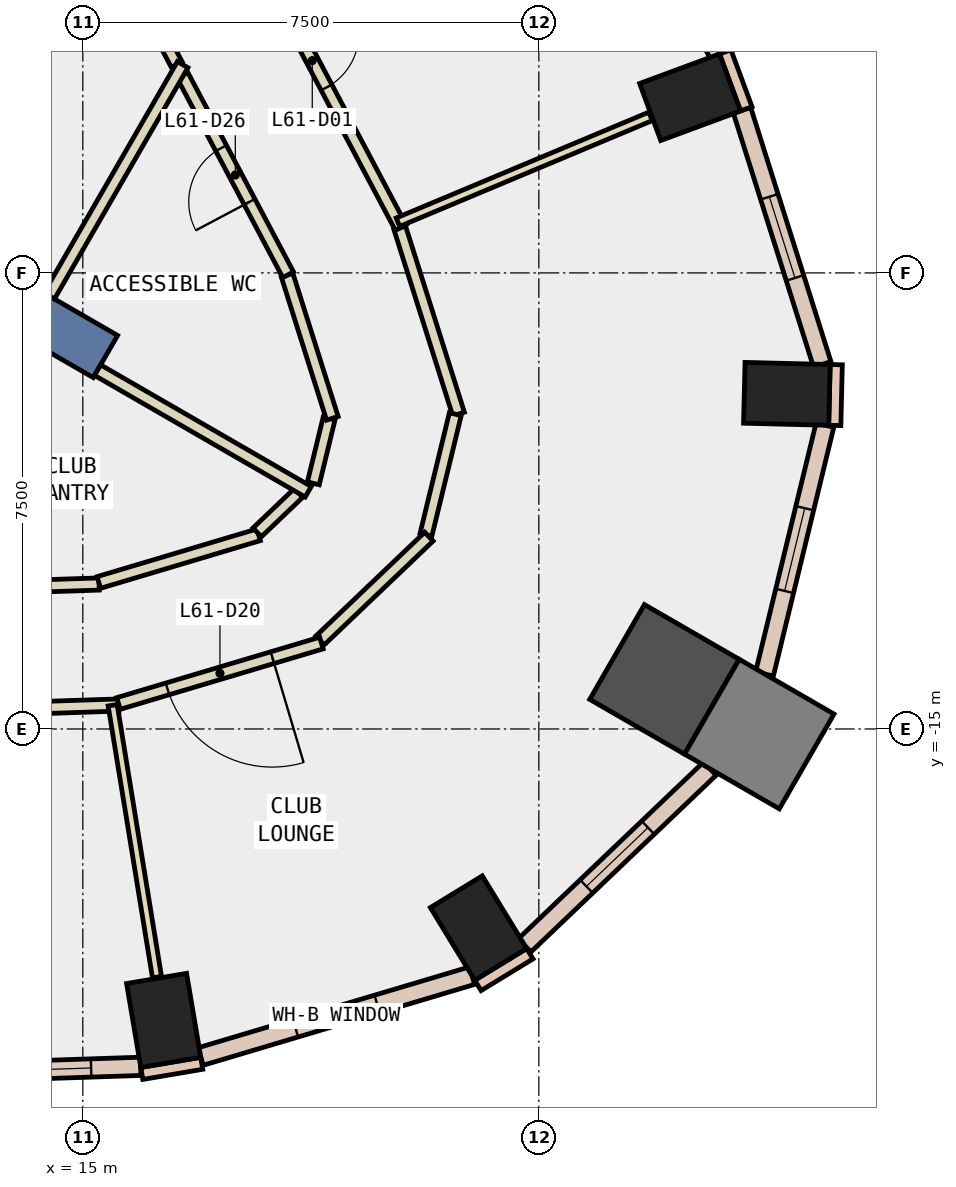
"""IFC4 building model, lengths in metres.
Left out: names, types, materials, properties, quantities, classifications, styles, units other than length and angle.
Written with IfcOpenShell. Run it as: python <this file> out.ifc"""

import sys

from ifc_helpers import new_model, si_unit, direction, frame, frame_2d, origin, origin_2d, place, context, subcontext, project, spatial, rectangle, extrude, element, fill, save


model = new_model("IFC4")
c1 = context("Model", 3, precision=1e-05, world=origin(), true_north=direction((0.0, 1.0)))
c2 = subcontext(c1, "Body", "Model", "MODEL_VIEW")
j1 = project(units=[si_unit("LENGTHUNIT", "METRE"), si_unit("PLANEANGLEUNIT", "RADIAN")], contexts=[c1])
p1 = place(None, origin())
s1 = spatial("IfcSite", under=j1, at=p1, CompositionType="ELEMENT")
p2 = place(p1, origin())
s2 = spatial("IfcBuilding", under=s1, at=p2, CompositionType="ELEMENT")
p3 = place(p2, frame((0.0, 0.0, 266.6)))
s3 = spatial("IfcBuildingStorey", under=s2, at=p3, CompositionType="ELEMENT", Elevation=266.6)
for number, where, z_axis, x_axis in (
    (1, (16.33, -19.793, -0.34), (0.0, 0.0, 1.0), (0.986, 0.167, 0.0)),
    (2, (21.508, -18.274, -0.34), (0.0, 0.0, 1.0), (0.853, 0.521, 0.0)),
):
    element("IfcColumn", number, at=place(p3, frame(where, z_axis=z_axis, x_axis=x_axis)), inside=s3, PredefinedType="COLUMN", context=c2, shape_type="SweptSolid", body=[
        extrude(rectangle(XDim=1.0, YDim=1.4, at=origin_2d()), origin(), (0.0, 0.0, 1.0), 3.6),
    ])
p4 = place(p3, frame((24.566, -14.184, -0.34), z_axis=(0.0, 0.0, 1.0), x_axis=(-0.866025403784, 0.5, 0.0)))
e3 = element("IfcColumn", 3, at=p4, inside=s3, PredefinedType="COLUMN", context=c2, shape_type="SweptSolid", body=[
    extrude(rectangle(XDim=1.8, YDim=1.8, at=origin_2d()), origin(), (0.0, 0.0, 1.0), 3.6),
])
for number, where, z_axis, x_axis in (
    (4, (26.579, -9.489, -0.34), (0.0, 0.0, 1.0), (0.025, 1.0, 0.0)),
    (5, (24.988, -4.611, -0.34), (0.0, 0.0, 1.0), (-0.347, 0.938, 0.0)),
):
    element("IfcColumn", number, at=place(p3, frame(where, z_axis=z_axis, x_axis=x_axis)), inside=s3, PredefinedType="COLUMN", context=c2, shape_type="SweptSolid", body=[
        extrude(rectangle(XDim=1.0, YDim=1.4, at=origin_2d()), origin(), (0.0, 0.0, 1.0), 3.6),
    ])
p5 = place(p3, frame((26.125, -15.084, -0.34), z_axis=(0.0, 0.0, 1.0), x_axis=(-0.866025403784, 0.5, 0.0)))
e6 = element("IfcColumn", 6, at=p5, inside=s3, PredefinedType="COLUMN", context=c2, shape_type="SweptSolid", body=[
    extrude(rectangle(XDim=1.8, YDim=1.8, at=origin_2d()), origin(), (0.0, 0.0, 1.0), 3.6),
])
p6 = place(p3, frame((7.578, -4.375, -0.34), z_axis=(0.0, 0.0, 1.0), x_axis=(0.866024315419, -0.5000018851, 0.0)))
e7 = element("IfcWall", 7, at=p6, inside=s3, PredefinedType="SHEAR", context=c2, shape_type="SweptSolid", body=[
    extrude(rectangle(XDim=9.0, YDim=0.8, at=frame_2d((4.5, 0.0))), origin(), (0.0, 0.0, 1.0), 3.6),
])
for number, where, z_axis, x_axis in (
    (8, (25.912, -4.803, 0.0), (0.0, 0.0, 1.0), (-0.347, 0.938, 0.0)),
    (9, (15.97, -20.665, 0.0), (0.0, 0.0, 1.0), (0.986, 0.167, 0.0)),
):
    element("IfcWall", number, at=place(p3, frame(where, z_axis=z_axis, x_axis=x_axis)), inside=s3, PredefinedType="STANDARD", context=c2, shape_type="SweptSolid", body=[
        extrude(rectangle(XDim=1.0, YDim=0.2, at=frame_2d((0.5, 0.0))), origin(), (0.0, 0.0, 1.0), 3.26),
    ])
p7 = place(p3, frame((21.498, -19.217, 0.0), z_axis=(0.0, 0.0, 1.0), x_axis=(0.853679739553, 0.520798331677, 0.0)))
e10 = element("IfcWall", 10, at=p7, inside=s3, PredefinedType="STANDARD", context=c2, shape_type="SweptSolid", body=[
    extrude(rectangle(XDim=1.0, YDim=0.2, at=frame_2d((0.5, 0.0))), origin(), (0.0, 0.0, 1.0), 3.26),
])
p8 = place(p3, frame((27.367, -10.008, 0.0), z_axis=(0.0, 0.0, 1.0), x_axis=(0.024186470916, 0.999707464524, 0.0)))
e11 = element("IfcWall", 11, at=p8, inside=s3, PredefinedType="STANDARD", context=c2, shape_type="SweptSolid", body=[
    extrude(rectangle(XDim=0.999, YDim=0.2, at=frame_2d((0.5, 0.0))), origin(), (0.0, 0.0, 1.0), 3.26),
])
p9 = place(p3, frame((8.296, -20.802, 0.0), z_axis=(0.0, 0.0, 1.0), x_axis=(0.999450376985, 0.033150323459, 0.0)))
e12 = element("IfcWall", 12, at=p9, inside=s3, PredefinedType="STANDARD", context=c2, shape_type="SweptSolid", body=[
    extrude(rectangle(XDim=7.659, YDim=0.3, at=frame_2d((3.83, 0.0))), origin(), (0.0, 0.0, 1.0), 3.26),
])
p10 = place(p9, frame((0.815, 0.0, 0.9)))
e13 = element("IfcOpeningElement", 13, at=p10, cuts=e12, PredefinedType="OPENING", context=c2, shape_type="SweptSolid", body=[
    extrude(rectangle(XDim=2.2, YDim=2.0, at=frame_2d((1.1, 1.0))), frame((0.0, 0.16, 0.0), z_axis=(0.0, -1.0, 0.0), x_axis=(1.0, 0.0, 0.0)), (0.0, 0.0, 1.0), 0.32),
])
p11 = place(p9, frame((4.644, 0.0, 0.9)))
e14 = element("IfcOpeningElement", 14, at=p11, cuts=e12, PredefinedType="OPENING", context=c2, shape_type="SweptSolid", body=[
    extrude(rectangle(XDim=2.2, YDim=2.0, at=frame_2d((1.1, 1.0))), frame((0.0, 0.16, 0.0), z_axis=(0.0, -1.0, 0.0), x_axis=(1.0, 0.0, 0.0)), (0.0, 0.0, 1.0), 0.32),
])
p12 = place(p3, frame((16.937, -20.387, 0.0), z_axis=(0.0, 0.0, 1.0), x_axis=(0.958361270465, 0.285558532131, 0.0)))
e15 = element("IfcWall", 15, at=p12, inside=s3, PredefinedType="STANDARD", context=c2, shape_type="SweptSolid", body=[
    extrude(rectangle(XDim=4.658, YDim=0.3, at=frame_2d((2.329, 0.0))), origin(), (0.0, 0.0, 1.0), 3.26),
])
p13 = place(p12, frame((1.629, 0.0, 0.9)))
e16 = element("IfcOpeningElement", 16, at=p13, cuts=e15, PredefinedType="OPENING", context=c2, shape_type="SweptSolid", body=[
    extrude(rectangle(XDim=1.4, YDim=2.0, at=frame_2d((0.7, 1.0))), frame((0.0, 0.16, 0.0), z_axis=(0.0, -1.0, 0.0), x_axis=(1.0, 0.0, 0.0)), (0.0, 0.0, 1.0), 0.32),
])
p14 = place(p3, frame((22.266, -18.559, 0.0), z_axis=(0.0, 0.0, 1.0), x_axis=(0.723526681061, 0.690296415892, 0.0)))
e17 = element("IfcWall", 17, at=p14, inside=s3, PredefinedType="STANDARD", context=c2, shape_type="SweptSolid", body=[
    extrude(rectangle(XDim=4.21, YDim=0.3, at=frame_2d((2.105, 0.0))), origin(), (0.0, 0.0, 1.0), 3.26),
])
p15 = place(p14, frame((1.405, 0.0, 0.9)))
e18 = element("IfcOpeningElement", 18, at=p15, cuts=e17, PredefinedType="OPENING", context=c2, shape_type="SweptSolid", body=[
    extrude(rectangle(XDim=1.4, YDim=2.0, at=frame_2d((0.7, 1.0))), frame((0.0, 0.16, 0.0), z_axis=(0.0, -1.0, 0.0), x_axis=(1.0, 0.0, 0.0)), (0.0, 0.0, 1.0), 0.32),
])
p16 = place(p3, frame((26.211, -14.095, 0.0), z_axis=(0.0, 0.0, 1.0), x_axis=(0.236077883519, 0.97173413695, 0.0)))
e19 = element("IfcWall", 19, at=p16, inside=s3, PredefinedType="STANDARD", context=c2, shape_type="SweptSolid", body=[
    extrude(rectangle(XDim=4.211, YDim=0.3, at=frame_2d((2.105, 0.0))), origin(), (0.0, 0.0, 1.0), 3.26),
])
p17 = place(p16, frame((1.405, 0.0, 0.9)))
e20 = element("IfcOpeningElement", 20, at=p17, cuts=e19, PredefinedType="OPENING", context=c2, shape_type="SweptSolid", body=[
    extrude(rectangle(XDim=1.4, YDim=2.0, at=frame_2d((0.7, 1.0))), frame((0.0, 0.16, 0.0), z_axis=(0.0, -1.0, 0.0), x_axis=(1.0, 0.0, 0.0)), (0.0, 0.0, 1.0), 0.32),
])
p18 = place(p3, frame((27.161, -9.004, 0.0), z_axis=(0.0, 0.0, 1.0), x_axis=(-0.30108868778, 0.953596142028, 0.0)))
e21 = element("IfcWall", 21, at=p18, inside=s3, PredefinedType="STANDARD", context=c2, shape_type="SweptSolid", body=[
    extrude(rectangle(XDim=4.38, YDim=0.3, at=frame_2d((2.19, 0.0))), origin(), (0.0, 0.0, 1.0), 3.26),
])
p19 = place(p18, frame((1.49, 0.0, 0.9)))
e22 = element("IfcOpeningElement", 22, at=p19, cuts=e21, PredefinedType="OPENING", context=c2, shape_type="SweptSolid", body=[
    extrude(rectangle(XDim=1.4, YDim=2.0, at=frame_2d((0.7, 1.0))), frame((0.0, 0.16, 0.0), z_axis=(0.0, -1.0, 0.0), x_axis=(1.0, 0.0, 0.0)), (0.0, 0.0, 1.0), 0.32),
])
p20 = place(p3, frame((25.454, -3.907, 0.0), z_axis=(0.0, 0.0, 1.0), x_axis=(-0.468220106253, 0.883611867338, 0.0)))
e23 = element("IfcWall", 23, at=p20, inside=s3, PredefinedType="STANDARD", context=c2, shape_type="SweptSolid", body=[
    extrude(rectangle(XDim=5.703, YDim=0.3, at=frame_2d((2.852, 0.0))), origin(), (0.0, 0.0, 1.0), 3.26),
])
p21 = place(p20, frame((0.476, 0.0, 0.9)))
e24 = element("IfcOpeningElement", 24, at=p21, cuts=e23, PredefinedType="OPENING", context=c2, shape_type="SweptSolid", body=[
    extrude(rectangle(XDim=1.9, YDim=2.0, at=frame_2d((0.95, 1.0))), frame((0.0, 0.16, 0.0), z_axis=(0.0, -1.0, 0.0), x_axis=(1.0, 0.0, 0.0)), (0.0, 0.0, 1.0), 0.32),
])
p22 = place(p20, frame((3.327, 0.0, 0.9)))
e25 = element("IfcOpeningElement", 25, at=p22, cuts=e23, PredefinedType="OPENING", context=c2, shape_type="SweptSolid", body=[
    extrude(rectangle(XDim=1.9, YDim=2.0, at=frame_2d((0.95, 1.0))), frame((0.0, 0.16, 0.0), z_axis=(0.0, -1.0, 0.0), x_axis=(1.0, 0.0, 0.0)), (0.0, 0.0, 1.0), 0.32),
])
p23 = place(p3, frame((16.545, -4.074, 0.0), z_axis=(0.0, 0.0, 1.0), x_axis=(-0.468321873419, 0.883557934081, 0.0)))
e26 = element("IfcWall", 26, at=p23, inside=s3, PredefinedType="PARTITIONING", context=c2, shape_type="SweptSolid", body=[
    extrude(rectangle(XDim=2.093, YDim=0.2, at=frame_2d((1.046, 0.0))), origin(), (0.0, 0.0, 1.0), 3.26),
])
p24 = place(p3, frame((11.716, -12.734, 0.0), z_axis=(0.0, 0.0, 1.0), x_axis=(0.999449093602, 0.03318899362, 0.0)))
e27 = element("IfcWall", 27, at=p24, inside=s3, PredefinedType="PARTITIONING", context=c2, shape_type="SweptSolid", body=[
    extrude(rectangle(XDim=3.553, YDim=0.2, at=frame_2d((1.776, 0.0))), origin(), (0.0, 0.0, 1.0), 3.26),
])
p25 = place(p24, frame((1.276, 0.0, 0.0)))
e28 = element("IfcOpeningElement", 28, at=p25, cuts=e27, PredefinedType="OPENING", context=c2, shape_type="SweptSolid", body=[
    extrude(rectangle(XDim=1.0, YDim=2.1, at=frame_2d((0.5, 1.05))), frame((0.0, 0.11, 0.0), z_axis=(0.0, -1.0, 0.0), x_axis=(1.0, 0.0, 0.0)), (0.0, 0.0, 1.0), 0.22),
])
p26 = place(p3, frame((15.263, -12.591, 0.0), z_axis=(0.0, 0.0, 1.0), x_axis=(0.958253964342, 0.285918414628, 0.0)))
e29 = element("IfcWall", 29, at=p26, inside=s3, PredefinedType="PARTITIONING", context=c2, shape_type="SweptSolid", body=[
    extrude(rectangle(XDim=2.743, YDim=0.2, at=frame_2d((1.371, 0.0))), origin(), (0.0, 0.0, 1.0), 3.26),
])
p27 = place(p3, frame((17.868, -11.767, 0.0), z_axis=(0.0, 0.0, 1.0), x_axis=(0.723402701671, 0.690426340181, 0.0)))
e30 = element("IfcWall", 30, at=p27, inside=s3, PredefinedType="PARTITIONING", context=c2, shape_type="SweptSolid", body=[
    extrude(rectangle(XDim=0.94, YDim=0.2, at=frame_2d((0.47, 0.0))), origin(), (0.0, 0.0, 1.0), 3.26),
])
p28 = place(p3, frame((18.791, -10.961, 0.0), z_axis=(0.0, 0.0, 1.0), x_axis=(0.236572634589, 0.971613806285, 0.0)))
e31 = element("IfcWall", 31, at=p28, inside=s3, PredefinedType="PARTITIONING", context=c2, shape_type="SweptSolid", body=[
    extrude(rectangle(XDim=1.099, YDim=0.2, at=frame_2d((0.55, 0.0))), origin(), (0.0, 0.0, 1.0), 3.26),
])
p29 = place(p3, frame((19.104, -9.891, 0.0), z_axis=(0.0, 0.0, 1.0), x_axis=(-0.301325410186, 0.953521366922, 0.0)))
e32 = element("IfcWall", 32, at=p29, inside=s3, PredefinedType="PARTITIONING", context=c2, shape_type="SweptSolid", body=[
    extrude(rectangle(XDim=2.469, YDim=0.2, at=frame_2d((1.234, 0.0))), origin(), (0.0, 0.0, 1.0), 3.26),
])
p30 = place(p3, frame((18.377, -7.53, 0.0), z_axis=(0.0, 0.0, 1.0), x_axis=(-0.468214048123, 0.883615077474, 0.0)))
e33 = element("IfcWall", 33, at=p30, inside=s3, PredefinedType="PARTITIONING", context=c2, shape_type="SweptSolid", body=[
    extrude(rectangle(XDim=3.712, YDim=0.2, at=frame_2d((1.856, 0.0))), origin(), (0.0, 0.0, 1.0), 3.26),
])
p31 = place(p30, frame((1.356, 0.0, 0.0)))
e34 = element("IfcOpeningElement", 34, at=p31, cuts=e33, PredefinedType="OPENING", context=c2, shape_type="SweptSolid", body=[
    extrude(rectangle(XDim=1.0, YDim=2.1, at=frame_2d((0.5, 1.05))), frame((0.0, 0.11, 0.0), z_axis=(0.0, -1.0, 0.0), x_axis=(1.0, 0.0, 0.0)), (0.0, 0.0, 1.0), 0.22),
])
p32 = place(p3, frame((15.591, -14.606, 0.0), z_axis=(0.0, 0.0, 1.0), x_axis=(-0.999445318732, -0.03330247535, 0.0)))
e35 = element("IfcWall", 35, at=p32, inside=s3, PredefinedType="PARTITIONING", context=c2, shape_type="SweptSolid", body=[
    extrude(rectangle(XDim=7.896, YDim=0.2, at=frame_2d((3.948, 0.0))), origin(), (0.0, 0.0, 1.0), 3.26),
])
p33 = place(p32, frame((3.498, 0.0, 0.0)))
e36 = element("IfcOpeningElement", 36, at=p33, cuts=e35, PredefinedType="OPENING", context=c2, shape_type="SweptSolid", body=[
    extrude(rectangle(XDim=0.9, YDim=2.1, at=frame_2d((0.45, 1.05))), frame((0.0, 0.11, 0.0), z_axis=(0.0, -1.0, 0.0), x_axis=(1.0, 0.0, 0.0)), (0.0, 0.0, 1.0), 0.22),
])
p34 = place(p3, frame((20.213, -6.761, 0.0), z_axis=(0.0, 0.0, 1.0), x_axis=(0.301331608119, -0.953519408271, 0.0)))
e37 = element("IfcWall", 37, at=p34, inside=s3, PredefinedType="PARTITIONING", context=c2, shape_type="SweptSolid", body=[
    extrude(rectangle(XDim=3.209, YDim=0.2, at=frame_2d((1.604, 0.0))), origin(), (0.0, 0.0, 1.0), 3.26),
])
p35 = place(p3, frame((21.126, -9.823, 0.0), z_axis=(0.0, 0.0, 1.0), x_axis=(-0.236372924437, -0.971662410816, 0.0)))
e38 = element("IfcWall", 38, at=p35, inside=s3, PredefinedType="PARTITIONING", context=c2, shape_type="SweptSolid", body=[
    extrude(rectangle(XDim=2.043, YDim=0.2, at=frame_2d((1.021, 0.0))), origin(), (0.0, 0.0, 1.0), 3.26),
])
p36 = place(p3, frame((20.692, -11.837, 0.0), z_axis=(0.0, 0.0, 1.0), x_axis=(-0.723668833869, -0.690147389248, 0.0)))
e39 = element("IfcWall", 39, at=p36, inside=s3, PredefinedType="PARTITIONING", context=c2, shape_type="SweptSolid", body=[
    extrude(rectangle(XDim=2.476, YDim=0.2, at=frame_2d((1.238, 0.0))), origin(), (0.0, 0.0, 1.0), 3.26),
])
p37 = place(p3, frame((18.924, -13.587, 0.0), z_axis=(0.0, 0.0, 1.0), x_axis=(-0.958378336681, -0.285501250052, 0.0)))
e40 = element("IfcWall", 40, at=p37, inside=s3, PredefinedType="PARTITIONING", context=c2, shape_type="SweptSolid", body=[
    extrude(rectangle(XDim=3.482, YDim=0.2, at=frame_2d((1.741, 0.0))), origin(), (0.0, 0.0, 1.0), 3.26),
])
p38 = place(p37, frame((0.841, 0.0, 0.0)))
e41 = element("IfcOpeningElement", 41, at=p38, cuts=e40, PredefinedType="OPENING", context=c2, shape_type="SweptSolid", body=[
    extrude(rectangle(XDim=1.8, YDim=2.1, at=frame_2d((0.9, 1.05))), frame((0.0, 0.11, 0.0), z_axis=(0.0, -1.0, 0.0), x_axis=(1.0, 0.0, 0.0)), (0.0, 0.0, 1.0), 0.22),
])
p39 = place(p3, frame((17.318, -1.262, 0.0), z_axis=(0.0, 0.0, 1.0), x_axis=(0.468313568794, -0.883562335822, 0.0)))
e42 = element("IfcWall", 42, at=p39, inside=s3, PredefinedType="PARTITIONING", context=c2, shape_type="SweptSolid", body=[
    extrude(rectangle(XDim=6.216, YDim=0.2, at=frame_2d((3.108, 0.0))), origin(), (0.0, 0.0, 1.0), 3.26),
])
p40 = place(p39, frame((2.608, 0.0, 0.0)))
e43 = element("IfcOpeningElement", 43, at=p40, cuts=e42, PredefinedType="OPENING", context=c2, shape_type="SweptSolid", body=[
    extrude(rectangle(XDim=1.0, YDim=2.1, at=frame_2d((0.5, 1.05))), frame((0.0, 0.11, 0.0), z_axis=(0.0, -1.0, 0.0), x_axis=(1.0, 0.0, 0.0)), (0.0, 0.0, 1.0), 0.22),
])
p41 = place(p3, frame((16.642, -4.075, 0.0), z_axis=(0.0, 0.0, 1.0), x_axis=(-0.49980426207, -0.866138383641, 0.0)))
e44 = element("IfcWall", 44, at=p41, inside=s3, PredefinedType="PARTITIONING", context=c2, shape_type="SweptSolid", body=[
    extrude(rectangle(XDim=4.392, YDim=0.2, at=frame_2d((2.196, 0.0))), origin(), (0.0, 0.0, 1.0), 3.26),
])
p42 = place(p3, frame((15.243, -9.099, 0.0), z_axis=(0.0, 0.0, 1.0), x_axis=(0.866026010844, -0.49999894854, 0.0)))
e45 = element("IfcWall", 45, at=p42, inside=s3, PredefinedType="PARTITIONING", context=c2, shape_type="SweptSolid", body=[
    extrude(rectangle(XDim=4.0, YDim=0.2, at=frame_2d((2.0, 0.0))), origin(), (0.0, 0.0, 1.0), 3.26),
])
p43 = place(p3, frame((15.491, -14.61, 0.0), z_axis=(0.0, 0.0, 1.0), x_axis=(0.160928343418, -0.986966092774, 0.0)))
e46 = element("IfcWall", 46, at=p43, inside=s3, PredefinedType="PARTITIONING", context=c2, shape_type="SweptSolid", body=[
    extrude(rectangle(XDim=4.53, YDim=0.15, at=frame_2d((2.265, 0.0))), origin(), (0.0, 0.0, 1.0), 3.26),
])
p44 = place(p3, frame((20.183, -6.666, 0.0), z_axis=(0.0, 0.0, 1.0), x_axis=(0.922347108299, 0.386362280525, 0.0)))
e47 = element("IfcWall", 47, at=p44, inside=s3, PredefinedType="PARTITIONING", context=c2, shape_type="SweptSolid", body=[
    extrude(rectangle(XDim=4.503, YDim=0.15, at=frame_2d((2.252, 0.0))), origin(), (0.0, 0.0, 1.0), 3.26),
])
p45 = place(p11, origin())
e48 = element("IfcWindow", 48, at=p45, inside=s3, PartitioningType="SINGLE_PANEL", PredefinedType="WINDOW", context=c2, shape_type="SweptSolid", body=[
    extrude(rectangle(XDim=2.2, YDim=2.0, at=frame_2d((1.1, 1.0))), frame((0.0, 0.03, 0.0), z_axis=(0.0, -1.0, 0.0), x_axis=(1.0, 0.0, 0.0)), (0.0, 0.0, 1.0), 0.06),
])
fill(e14, e48)
p46 = place(p13, origin())
e49 = element("IfcWindow", 49, at=p46, inside=s3, PartitioningType="SINGLE_PANEL", PredefinedType="WINDOW", context=c2, shape_type="SweptSolid", body=[
    extrude(rectangle(XDim=1.4, YDim=2.0, at=frame_2d((0.7, 1.0))), frame((0.0, 0.03, 0.0), z_axis=(0.0, -1.0, 0.0), x_axis=(1.0, 0.0, 0.0)), (0.0, 0.0, 1.0), 0.06),
])
fill(e16, e49)
p47 = place(p15, origin())
e50 = element("IfcWindow", 50, at=p47, inside=s3, PartitioningType="SINGLE_PANEL", PredefinedType="WINDOW", context=c2, shape_type="SweptSolid", body=[
    extrude(rectangle(XDim=1.4, YDim=2.0, at=frame_2d((0.7, 1.0))), frame((0.0, 0.03, 0.0), z_axis=(0.0, -1.0, 0.0), x_axis=(1.0, 0.0, 0.0)), (0.0, 0.0, 1.0), 0.06),
])
fill(e18, e50)
p48 = place(p17, origin())
e51 = element("IfcWindow", 51, at=p48, inside=s3, PartitioningType="SINGLE_PANEL", PredefinedType="WINDOW", context=c2, shape_type="SweptSolid", body=[
    extrude(rectangle(XDim=1.4, YDim=2.0, at=frame_2d((0.7, 1.0))), frame((0.0, 0.03, 0.0), z_axis=(0.0, -1.0, 0.0), x_axis=(1.0, 0.0, 0.0)), (0.0, 0.0, 1.0), 0.06),
])
fill(e20, e51)
p49 = place(p19, origin())
e52 = element("IfcWindow", 52, at=p49, inside=s3, PartitioningType="SINGLE_PANEL", PredefinedType="WINDOW", context=c2, shape_type="SweptSolid", body=[
    extrude(rectangle(XDim=1.4, YDim=2.0, at=frame_2d((0.7, 1.0))), frame((0.0, 0.03, 0.0), z_axis=(0.0, -1.0, 0.0), x_axis=(1.0, 0.0, 0.0)), (0.0, 0.0, 1.0), 0.06),
])
fill(e22, e52)
p50 = place(p40, origin())
e53 = element("IfcDoor", 53, at=p50, inside=s3, OperationType="SINGLE_SWING_LEFT", PredefinedType="DOOR", context=c2, shape_type="SweptSolid", body=[
    extrude(rectangle(XDim=1.0, YDim=2.1, at=frame_2d((0.5, 1.05))), frame((0.0, 0.025, 0.0), z_axis=(0.0, -1.0, 0.0), x_axis=(1.0, 0.0, 0.0)), (0.0, 0.0, 1.0), 0.05),
])
fill(e43, e53)
p51 = place(p38, origin())
e54 = element("IfcDoor", 54, at=p51, inside=s3, OperationType="DOUBLE_DOOR_SINGLE_SWING", PredefinedType="DOOR", context=c2, shape_type="SweptSolid", body=[
    extrude(rectangle(XDim=1.8, YDim=2.1, at=frame_2d((0.9, 1.05))), frame((0.0, 0.025, 0.0), z_axis=(0.0, -1.0, 0.0), x_axis=(1.0, 0.0, 0.0)), (0.0, 0.0, 1.0), 0.05),
])
fill(e41, e54)
p52 = place(p31, origin())
e55 = element("IfcDoor", 55, at=p52, inside=s3, OperationType="SINGLE_SWING_RIGHT", PredefinedType="DOOR", context=c2, shape_type="SweptSolid", body=[
    extrude(rectangle(XDim=1.0, YDim=2.1, at=frame_2d((0.5, 1.05))), frame((0.0, 0.025, 0.0), z_axis=(0.0, -1.0, 0.0), x_axis=(1.0, 0.0, 0.0)), (0.0, 0.0, 1.0), 0.05),
])
fill(e34, e55)
save(model, sys.argv[1])
